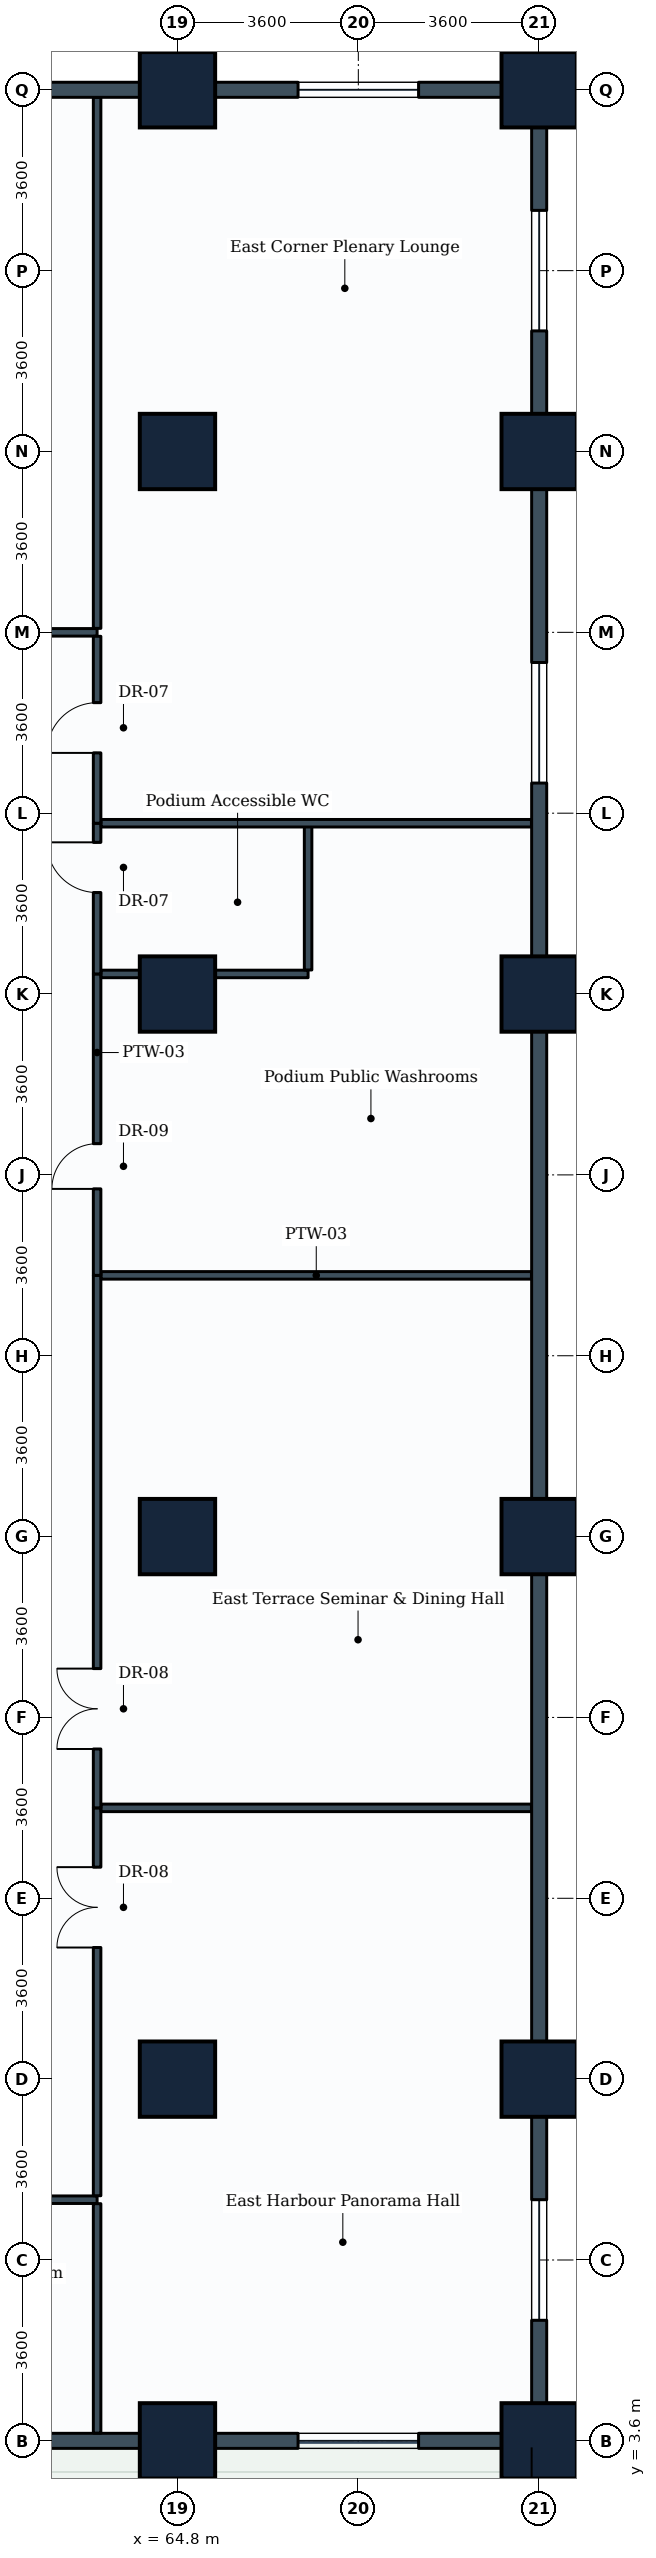
"""IFC4 building model, lengths in metres.
Left out: names, types, materials, properties, quantities, classifications, styles, units other than length and angle.
Written with IfcOpenShell. Run it as: python <this file> out.ifc"""

import sys

from ifc_helpers import new_model, si_unit, direction, frame, frame_2d, origin, origin_2d, place, context, subcontext, project, spatial, rectangle, extrude, element, fill, save


model = new_model("IFC4")
c1 = context("Model", 3, precision=1e-05, world=origin(), true_north=direction((0.0, 1.0)))
c2 = subcontext(c1, "Body", "Model", "MODEL_VIEW")
j1 = project(units=[si_unit("LENGTHUNIT", "METRE"), si_unit("PLANEANGLEUNIT", "RADIAN")], contexts=[c1])
p1 = place(None, origin())
s1 = spatial("IfcSite", under=j1, at=p1, CompositionType="ELEMENT")
p2 = place(p1, origin())
s2 = spatial("IfcBuilding", under=s1, at=p2, CompositionType="ELEMENT")
p3 = place(p2, frame((0.0, 0.0, 14.8)))
s3 = spatial("IfcBuildingStorey", under=s2, at=p3, CompositionType="ELEMENT", Elevation=14.8)
for number, where, z_axis, x_axis in (
    (1, (64.8, 3.6, 0.0), (0.0, 0.0, 1.0), (1.0, 0.0, 0.0)),
    (2, (64.8, 10.8, 0.0), (0.0, 0.0, 1.0), (1.0, 0.0, 0.0)),
    (3, (64.8, 21.6, 0.0), (0.0, 0.0, 1.0), (1.0, 0.0, 0.0)),
    (4, (64.8, 32.4, 0.0), (0.0, 0.0, 1.0), (1.0, 0.0, 0.0)),
    (5, (64.8, 43.2, 0.0), (0.0, 0.0, 1.0), (1.0, 0.0, 0.0)),
    (6, (64.8, 50.4, 0.0), (0.0, 0.0, 1.0), (1.0, 0.0, 0.0)),
    (7, (72.0, 3.6, 0.0), (0.0, 0.0, 1.0), (1.0, 0.0, 0.0)),
    (8, (72.0, 10.8, 0.0), (0.0, 0.0, 1.0), (1.0, 0.0, 0.0)),
    (9, (72.0, 21.6, 0.0), (0.0, 0.0, 1.0), (1.0, 0.0, 0.0)),
    (10, (72.0, 32.4, 0.0), (0.0, 0.0, 1.0), (1.0, 0.0, 0.0)),
    (11, (72.0, 43.2, 0.0), (0.0, 0.0, 1.0), (1.0, 0.0, 0.0)),
    (12, (72.0, 50.4, 0.0), (0.0, 0.0, 1.0), (1.0, 0.0, 0.0)),
):
    element("IfcColumn", number, at=place(p3, frame(where, z_axis=z_axis, x_axis=x_axis)), inside=s3, PredefinedType="COLUMN", context=c2, shape_type="SweptSolid", body=[
        extrude(rectangle(XDim=1.5, YDim=1.5, at=origin_2d()), origin(), (0.0, 0.0, 1.0), 4.6),
    ])
p4 = place(p3, frame((64.8, 3.6, 0.0), z_axis=(0.0, 0.0, 1.0), x_axis=(-1.0, 0.0, 0.0)))
e13 = element("IfcWall", 13, at=p4, inside=s3, PredefinedType="STANDARD", context=c2, shape_type="SweptSolid", body=[
    extrude(rectangle(XDim=10.8, YDim=0.3, at=frame_2d((5.4, 0.0))), origin(), (0.0, 0.0, 1.0), 3.63),
])
p5 = place(p4, frame((4.2, 0.0, 0.85)))
e14 = element("IfcOpeningElement", 14, at=p5, cuts=e13, PredefinedType="OPENING", context=c2, shape_type="SweptSolid", body=[
    extrude(rectangle(XDim=2.4, YDim=1.6, at=frame_2d((1.2, 0.8))), frame((0.0, 0.16, 0.0), z_axis=(0.0, -1.0, 0.0), x_axis=(1.0, 0.0, 0.0)), (0.0, 0.0, 1.0), 0.32),
])
p6 = place(p3, frame((72.0, 3.6, 0.0), z_axis=(0.0, 0.0, 1.0), x_axis=(-1.0, 0.0, 0.0)))
e15 = element("IfcWall", 15, at=p6, inside=s3, PredefinedType="STANDARD", context=c2, shape_type="SweptSolid", body=[
    extrude(rectangle(XDim=7.2, YDim=0.3, at=frame_2d((3.6, 0.0))), origin(), (0.0, 0.0, 1.0), 3.23),
])
p7 = place(p6, frame((2.4, 0.0, 0.85)))
e16 = element("IfcOpeningElement", 16, at=p7, cuts=e15, PredefinedType="OPENING", context=c2, shape_type="SweptSolid", body=[
    extrude(rectangle(XDim=2.4, YDim=1.6, at=frame_2d((1.2, 0.8))), frame((0.0, 0.16, 0.0), z_axis=(0.0, -1.0, 0.0), x_axis=(1.0, 0.0, 0.0)), (0.0, 0.0, 1.0), 0.32),
])
p8 = place(p3, frame((72.0, 10.8, 0.0), z_axis=(0.0, 0.0, 1.0), x_axis=(0.0, -1.0, 0.0)))
e17 = element("IfcWall", 17, at=p8, inside=s3, PredefinedType="STANDARD", context=c2, shape_type="SweptSolid", body=[
    extrude(rectangle(XDim=7.2, YDim=0.3, at=frame_2d((3.6, 0.0))), origin(), (0.0, 0.0, 1.0), 3.23),
])
p9 = place(p8, frame((2.4, 0.0, 0.85)))
e18 = element("IfcOpeningElement", 18, at=p9, cuts=e17, PredefinedType="OPENING", context=c2, shape_type="SweptSolid", body=[
    extrude(rectangle(XDim=2.4, YDim=1.6, at=frame_2d((1.2, 0.8))), frame((0.0, 0.16, 0.0), z_axis=(0.0, -1.0, 0.0), x_axis=(1.0, 0.0, 0.0)), (0.0, 0.0, 1.0), 0.32),
])
p10 = place(p3, frame((72.0, 21.6, 0.0), z_axis=(0.0, 0.0, 1.0), x_axis=(0.0, -1.0, 0.0)))
e19 = element("IfcWall", 19, at=p10, inside=s3, PredefinedType="STANDARD", context=c2, shape_type="SweptSolid", body=[
    extrude(rectangle(XDim=10.8, YDim=0.3, at=frame_2d((5.4, 0.0))), origin(), (0.0, 0.0, 1.0), 3.23),
])
p11 = place(p3, frame((72.0, 32.4, 0.0), z_axis=(0.0, 0.0, 1.0), x_axis=(0.0, -1.0, 0.0)))
e20 = element("IfcWall", 20, at=p11, inside=s3, PredefinedType="STANDARD", context=c2, shape_type="SweptSolid", body=[
    extrude(rectangle(XDim=10.8, YDim=0.3, at=frame_2d((5.4, 0.0))), origin(), (0.0, 0.0, 1.0), 3.23),
])
p12 = place(p3, frame((72.0, 43.2, 0.0), z_axis=(0.0, 0.0, 1.0), x_axis=(0.0, -1.0, 0.0)))
e21 = element("IfcWall", 21, at=p12, inside=s3, PredefinedType="STANDARD", context=c2, shape_type="SweptSolid", body=[
    extrude(rectangle(XDim=10.8, YDim=0.3, at=frame_2d((5.4, 0.0))), origin(), (0.0, 0.0, 1.0), 3.23),
])
p13 = place(p12, frame((4.2, 0.0, 0.85)))
e22 = element("IfcOpeningElement", 22, at=p13, cuts=e21, PredefinedType="OPENING", context=c2, shape_type="SweptSolid", body=[
    extrude(rectangle(XDim=2.4, YDim=1.6, at=frame_2d((1.2, 0.8))), frame((0.0, 0.16, 0.0), z_axis=(0.0, -1.0, 0.0), x_axis=(1.0, 0.0, 0.0)), (0.0, 0.0, 1.0), 0.32),
])
p14 = place(p3, frame((72.0, 50.4, 0.0), z_axis=(0.0, 0.0, 1.0), x_axis=(0.0, -1.0, 0.0)))
e23 = element("IfcWall", 23, at=p14, inside=s3, PredefinedType="STANDARD", context=c2, shape_type="SweptSolid", body=[
    extrude(rectangle(XDim=7.2, YDim=0.3, at=frame_2d((3.6, 0.0))), origin(), (0.0, 0.0, 1.0), 3.23),
])
p15 = place(p14, frame((2.4, 0.0, 0.85)))
e24 = element("IfcOpeningElement", 24, at=p15, cuts=e23, PredefinedType="OPENING", context=c2, shape_type="SweptSolid", body=[
    extrude(rectangle(XDim=2.4, YDim=1.6, at=frame_2d((1.2, 0.8))), frame((0.0, 0.16, 0.0), z_axis=(0.0, -1.0, 0.0), x_axis=(1.0, 0.0, 0.0)), (0.0, 0.0, 1.0), 0.32),
])
p16 = place(p3, frame((54.0, 50.4, 0.0), z_axis=(0.0, 0.0, 1.0), x_axis=(1.0, 0.0, 0.0)))
e25 = element("IfcWall", 25, at=p16, inside=s3, PredefinedType="STANDARD", context=c2, shape_type="SweptSolid", body=[
    extrude(rectangle(XDim=10.8, YDim=0.3, at=frame_2d((5.4, 0.0))), origin(), (0.0, 0.0, 1.0), 3.63),
])
p17 = place(p16, frame((4.2, 0.0, 0.85)))
e26 = element("IfcOpeningElement", 26, at=p17, cuts=e25, PredefinedType="OPENING", context=c2, shape_type="SweptSolid", body=[
    extrude(rectangle(XDim=2.4, YDim=1.6, at=frame_2d((1.2, 0.8))), frame((0.0, 0.16, 0.0), z_axis=(0.0, -1.0, 0.0), x_axis=(1.0, 0.0, 0.0)), (0.0, 0.0, 1.0), 0.32),
])
p18 = place(p3, frame((64.8, 50.4, 0.0), z_axis=(0.0, 0.0, 1.0), x_axis=(1.0, 0.0, 0.0)))
e27 = element("IfcWall", 27, at=p18, inside=s3, PredefinedType="STANDARD", context=c2, shape_type="SweptSolid", body=[
    extrude(rectangle(XDim=7.2, YDim=0.3, at=frame_2d((3.6, 0.0))), origin(), (0.0, 0.0, 1.0), 3.23),
])
p19 = place(p18, frame((2.4, 0.0, 0.85)))
e28 = element("IfcOpeningElement", 28, at=p19, cuts=e27, PredefinedType="OPENING", context=c2, shape_type="SweptSolid", body=[
    extrude(rectangle(XDim=2.4, YDim=1.6, at=frame_2d((1.2, 0.8))), frame((0.0, 0.16, 0.0), z_axis=(0.0, -1.0, 0.0), x_axis=(1.0, 0.0, 0.0)), (0.0, 0.0, 1.0), 0.32),
])
p20 = place(p3, frame((54.0, 8.4, 0.0), z_axis=(0.0, 0.0, 1.0), x_axis=(1.0, 0.0, 0.0)))
e29 = element("IfcWall", 29, at=p20, inside=s3, PredefinedType="PARTITIONING", context=c2, shape_type="SweptSolid", body=[
    extrude(rectangle(XDim=9.2, YDim=0.15, at=frame_2d((4.6, 0.0))), origin(), (0.0, 0.0, 1.0), 3.63),
])
p21 = place(p20, frame((3.482, 0.0, 0.0)))
e30 = element("IfcOpeningElement", 30, at=p21, cuts=e29, PredefinedType="OPENING", context=c2, shape_type="SweptSolid", body=[
    extrude(rectangle(XDim=1.6, YDim=2.2, at=frame_2d((0.8, 1.1))), frame((0.0, 0.085, 0.0), z_axis=(0.0, -1.0, 0.0), x_axis=(1.0, 0.0, 0.0)), (0.0, 0.0, 1.0), 0.17),
])
p22 = place(p3, frame((33.6, 39.6, 0.0), z_axis=(0.0, 0.0, 1.0), x_axis=(1.0, 0.0, 0.0)))
e31 = element("IfcWall", 31, at=p22, inside=s3, PredefinedType="PARTITIONING", context=c2, shape_type="SweptSolid", body=[
    extrude(rectangle(XDim=29.6, YDim=0.15, at=frame_2d((14.8, 0.0))), origin(), (0.0, 0.0, 1.0), 3.63),
])
p23 = place(p22, frame((13.96, 0.0, 0.0)))
e32 = element("IfcOpeningElement", 32, at=p23, cuts=e31, PredefinedType="OPENING", context=c2, shape_type="SweptSolid", body=[
    extrude(rectangle(XDim=1.6, YDim=2.2, at=frame_2d((0.8, 1.1))), frame((0.0, 0.085, 0.0), z_axis=(0.0, -1.0, 0.0), x_axis=(1.0, 0.0, 0.0)), (0.0, 0.0, 1.0), 0.17),
])
p24 = place(p3, frame((63.2, 3.754, 0.0), z_axis=(0.0, 0.0, 1.0), x_axis=(0.0, 1.0, 0.0)))
e33 = element("IfcWall", 33, at=p24, inside=s3, PredefinedType="PARTITIONING", context=c2, shape_type="SweptSolid", body=[
    extrude(rectangle(XDim=4.567, YDim=0.15, at=frame_2d((2.284, 0.0))), origin(), (0.0, 0.0, 1.0), 4.285),
])
p25 = place(p3, frame((63.2, 8.479, 0.0), z_axis=(0.0, 0.0, 1.0), x_axis=(0.0, 1.0, 0.0)))
e34 = element("IfcWall", 34, at=p25, inside=s3, PredefinedType="PARTITIONING", context=c2, shape_type="SweptSolid", body=[
    extrude(rectangle(XDim=7.721, YDim=0.15, at=frame_2d((3.86, 0.0))), origin(), (0.0, 0.0, 1.0), 3.63),
])
p26 = place(p25, frame((4.941, 0.0, 0.0)))
e35 = element("IfcOpeningElement", 35, at=p26, cuts=e34, PredefinedType="OPENING", context=c2, shape_type="SweptSolid", body=[
    extrude(rectangle(XDim=1.6, YDim=2.2, at=frame_2d((0.8, 1.1))), frame((0.0, 0.085, 0.0), z_axis=(0.0, -1.0, 0.0), x_axis=(1.0, 0.0, 0.0)), (0.0, 0.0, 1.0), 0.17),
])
p27 = place(p3, frame((63.279, 16.2, 0.0), z_axis=(0.0, 0.0, 1.0), x_axis=(1.0, 0.0, 0.0)))
e36 = element("IfcWall", 36, at=p27, inside=s3, PredefinedType="PARTITIONING", context=c2, shape_type="SweptSolid", body=[
    extrude(rectangle(XDim=8.567, YDim=0.15, at=frame_2d((4.283, 0.0))), origin(), (0.0, 0.0, 1.0), 3.63),
])
p28 = place(p3, frame((63.2, 16.2, 0.0), z_axis=(0.0, 0.0, 1.0), x_axis=(0.0, 1.0, 0.0)))
e37 = element("IfcWall", 37, at=p28, inside=s3, PredefinedType="PARTITIONING", context=c2, shape_type="SweptSolid", body=[
    extrude(rectangle(XDim=10.6, YDim=0.15, at=frame_2d((5.3, 0.0))), origin(), (0.0, 0.0, 1.0), 3.63),
])
p29 = place(p28, frame((1.172, 0.0, 0.0)))
e38 = element("IfcOpeningElement", 38, at=p29, cuts=e37, PredefinedType="OPENING", context=c2, shape_type="SweptSolid", body=[
    extrude(rectangle(XDim=1.6, YDim=2.2, at=frame_2d((0.8, 1.1))), frame((0.0, 0.085, 0.0), z_axis=(0.0, -1.0, 0.0), x_axis=(1.0, 0.0, 0.0)), (0.0, 0.0, 1.0), 0.17),
])
p30 = place(p3, frame((63.279, 26.8, 0.0), z_axis=(0.0, 0.0, 1.0), x_axis=(1.0, 0.0, 0.0)))
e39 = element("IfcWall", 39, at=p30, inside=s3, PredefinedType="PARTITIONING", context=c2, shape_type="SweptSolid", body=[
    extrude(rectangle(XDim=8.567, YDim=0.15, at=frame_2d((4.283, 0.0))), origin(), (0.0, 0.0, 1.0), 3.63),
])
p31 = place(p3, frame((63.2, 26.8, 0.0), z_axis=(0.0, 0.0, 1.0), x_axis=(0.0, 1.0, 0.0)))
e40 = element("IfcWall", 40, at=p31, inside=s3, PredefinedType="PARTITIONING", context=c2, shape_type="SweptSolid", body=[
    extrude(rectangle(XDim=6.0, YDim=0.15, at=frame_2d((3.0, 0.0))), origin(), (0.0, 0.0, 1.0), 3.63),
])
p32 = place(p31, frame((1.721, 0.0, 0.0)))
e41 = element("IfcOpeningElement", 41, at=p32, cuts=e40, PredefinedType="OPENING", context=c2, shape_type="SweptSolid", body=[
    extrude(rectangle(XDim=0.9, YDim=2.1, at=frame_2d((0.45, 1.05))), frame((0.0, 0.085, 0.0), z_axis=(0.0, -1.0, 0.0), x_axis=(1.0, 0.0, 0.0)), (0.0, 0.0, 1.0), 0.17),
])
p33 = place(p3, frame((63.279, 32.8, 0.0), z_axis=(0.0, 0.0, 1.0), x_axis=(1.0, 0.0, 0.0)))
e42 = element("IfcWall", 42, at=p33, inside=s3, PredefinedType="PARTITIONING", context=c2, shape_type="SweptSolid", body=[
    extrude(rectangle(XDim=4.121, YDim=0.15, at=frame_2d((2.061, 0.0))), origin(), (0.0, 0.0, 1.0), 3.23),
])
p34 = place(p3, frame((67.4, 32.879, 0.0), z_axis=(0.0, 0.0, 1.0), x_axis=(0.0, 1.0, 0.0)))
e43 = element("IfcWall", 43, at=p34, inside=s3, PredefinedType="PARTITIONING", context=c2, shape_type="SweptSolid", body=[
    extrude(rectangle(XDim=2.921, YDim=0.15, at=frame_2d((1.46, 0.0))), origin(), (0.0, 0.0, 1.0), 4.285),
])
p35 = place(p3, frame((63.2, 32.8, 0.0), z_axis=(0.0, 0.0, 1.0), x_axis=(0.0, 1.0, 0.0)))
e44 = element("IfcWall", 44, at=p35, inside=s3, PredefinedType="PARTITIONING", context=c2, shape_type="SweptSolid", body=[
    extrude(rectangle(XDim=3.0, YDim=0.15, at=frame_2d((1.5, 0.0))), origin(), (0.0, 0.0, 1.0), 4.285),
])
p36 = place(p35, frame((1.62, 0.0, 0.0)))
e45 = element("IfcOpeningElement", 45, at=p36, cuts=e44, PredefinedType="OPENING", context=c2, shape_type="SweptSolid", body=[
    extrude(rectangle(XDim=1.0, YDim=2.1, at=frame_2d((0.5, 1.05))), frame((0.0, 0.085, 0.0), z_axis=(0.0, -1.0, 0.0), x_axis=(1.0, 0.0, 0.0)), (0.0, 0.0, 1.0), 0.17),
])
p37 = place(p3, frame((63.279, 35.8, 0.0), z_axis=(0.0, 0.0, 1.0), x_axis=(1.0, 0.0, 0.0)))
e46 = element("IfcWall", 46, at=p37, inside=s3, PredefinedType="PARTITIONING", context=c2, shape_type="SweptSolid", body=[
    extrude(rectangle(XDim=8.567, YDim=0.15, at=frame_2d((4.283, 0.0))), origin(), (0.0, 0.0, 1.0), 3.63),
])
p38 = place(p3, frame((63.2, 35.8, 0.0), z_axis=(0.0, 0.0, 1.0), x_axis=(0.0, 1.0, 0.0)))
e47 = element("IfcWall", 47, at=p38, inside=s3, PredefinedType="PARTITIONING", context=c2, shape_type="SweptSolid", body=[
    extrude(rectangle(XDim=3.721, YDim=0.15, at=frame_2d((1.86, 0.0))), origin(), (0.0, 0.0, 1.0), 4.285),
])
p39 = place(p38, frame((1.4, 0.0, 0.0)))
e48 = element("IfcOpeningElement", 48, at=p39, cuts=e47, PredefinedType="OPENING", context=c2, shape_type="SweptSolid", body=[
    extrude(rectangle(XDim=1.0, YDim=2.1, at=frame_2d((0.5, 1.05))), frame((0.0, 0.085, 0.0), z_axis=(0.0, -1.0, 0.0), x_axis=(1.0, 0.0, 0.0)), (0.0, 0.0, 1.0), 0.17),
])
p40 = place(p3, frame((63.2, 39.679, 0.0), z_axis=(0.0, 0.0, 1.0), x_axis=(0.0, 1.0, 0.0)))
e49 = element("IfcWall", 49, at=p40, inside=s3, PredefinedType="PARTITIONING", context=c2, shape_type="SweptSolid", body=[
    extrude(rectangle(XDim=10.567, YDim=0.15, at=frame_2d((5.284, 0.0))), origin(), (0.0, 0.0, 1.0), 3.63),
])
p41 = place(p7, origin())
e50 = element("IfcWindow", 50, at=p41, inside=s3, PartitioningType="SINGLE_PANEL", PredefinedType="WINDOW", context=c2, shape_type="SweptSolid", body=[
    extrude(rectangle(XDim=2.4, YDim=1.6, at=frame_2d((1.2, 0.8))), frame((0.0, 0.03, 0.0), z_axis=(0.0, -1.0, 0.0), x_axis=(1.0, 0.0, 0.0)), (0.0, 0.0, 1.0), 0.06),
])
fill(e16, e50)
p42 = place(p9, origin())
e51 = element("IfcWindow", 51, at=p42, inside=s3, PartitioningType="SINGLE_PANEL", PredefinedType="WINDOW", context=c2, shape_type="SweptSolid", body=[
    extrude(rectangle(XDim=2.4, YDim=1.6, at=frame_2d((1.2, 0.8))), frame((0.0, 0.03, 0.0), z_axis=(0.0, -1.0, 0.0), x_axis=(1.0, 0.0, 0.0)), (0.0, 0.0, 1.0), 0.06),
])
fill(e18, e51)
p43 = place(p13, origin())
e52 = element("IfcWindow", 52, at=p43, inside=s3, PartitioningType="SINGLE_PANEL", PredefinedType="WINDOW", context=c2, shape_type="SweptSolid", body=[
    extrude(rectangle(XDim=2.4, YDim=1.6, at=frame_2d((1.2, 0.8))), frame((0.0, 0.03, 0.0), z_axis=(0.0, -1.0, 0.0), x_axis=(1.0, 0.0, 0.0)), (0.0, 0.0, 1.0), 0.06),
])
fill(e22, e52)
p44 = place(p15, origin())
e53 = element("IfcWindow", 53, at=p44, inside=s3, PartitioningType="SINGLE_PANEL", PredefinedType="WINDOW", context=c2, shape_type="SweptSolid", body=[
    extrude(rectangle(XDim=2.4, YDim=1.6, at=frame_2d((1.2, 0.8))), frame((0.0, 0.03, 0.0), z_axis=(0.0, -1.0, 0.0), x_axis=(1.0, 0.0, 0.0)), (0.0, 0.0, 1.0), 0.06),
])
fill(e24, e53)
p45 = place(p19, origin())
e54 = element("IfcWindow", 54, at=p45, inside=s3, PartitioningType="SINGLE_PANEL", PredefinedType="WINDOW", context=c2, shape_type="SweptSolid", body=[
    extrude(rectangle(XDim=2.4, YDim=1.6, at=frame_2d((1.2, 0.8))), frame((0.0, 0.03, 0.0), z_axis=(0.0, -1.0, 0.0), x_axis=(1.0, 0.0, 0.0)), (0.0, 0.0, 1.0), 0.06),
])
fill(e28, e54)
p46 = place(p26, origin())
e55 = element("IfcDoor", 55, at=p46, inside=s3, OperationType="DOUBLE_DOOR_SINGLE_SWING", PredefinedType="DOOR", context=c2, shape_type="SweptSolid", body=[
    extrude(rectangle(XDim=1.6, YDim=2.2, at=frame_2d((0.8, 1.1))), frame((0.0, 0.025, 0.0), z_axis=(0.0, -1.0, 0.0), x_axis=(1.0, 0.0, 0.0)), (0.0, 0.0, 1.0), 0.05),
])
fill(e35, e55)
p47 = place(p29, origin())
e56 = element("IfcDoor", 56, at=p47, inside=s3, OperationType="DOUBLE_DOOR_SINGLE_SWING", PredefinedType="DOOR", context=c2, shape_type="SweptSolid", body=[
    extrude(rectangle(XDim=1.6, YDim=2.2, at=frame_2d((0.8, 1.1))), frame((0.0, 0.025, 0.0), z_axis=(0.0, -1.0, 0.0), x_axis=(1.0, 0.0, 0.0)), (0.0, 0.0, 1.0), 0.05),
])
fill(e38, e56)
p48 = place(p32, origin())
e57 = element("IfcDoor", 57, at=p48, inside=s3, OperationType="SINGLE_SWING_LEFT", PredefinedType="DOOR", context=c2, shape_type="SweptSolid", body=[
    extrude(rectangle(XDim=0.9, YDim=2.1, at=frame_2d((0.45, 1.05))), frame((0.0, 0.025, 0.0), z_axis=(0.0, -1.0, 0.0), x_axis=(1.0, 0.0, 0.0)), (0.0, 0.0, 1.0), 0.05),
])
fill(e41, e57)
p49 = place(p36, origin())
e58 = element("IfcDoor", 58, at=p49, inside=s3, OperationType="SINGLE_SWING_RIGHT", PredefinedType="DOOR", context=c2, shape_type="SweptSolid", body=[
    extrude(rectangle(XDim=1.0, YDim=2.1, at=frame_2d((0.5, 1.05))), frame((0.0, 0.025, 0.0), z_axis=(0.0, -1.0, 0.0), x_axis=(1.0, 0.0, 0.0)), (0.0, 0.0, 1.0), 0.05),
])
fill(e45, e58)
p50 = place(p39, origin())
e59 = element("IfcDoor", 59, at=p50, inside=s3, OperationType="SINGLE_SWING_LEFT", PredefinedType="DOOR", context=c2, shape_type="SweptSolid", body=[
    extrude(rectangle(XDim=1.0, YDim=2.1, at=frame_2d((0.5, 1.05))), frame((0.0, 0.025, 0.0), z_axis=(0.0, -1.0, 0.0), x_axis=(1.0, 0.0, 0.0)), (0.0, 0.0, 1.0), 0.05),
])
fill(e48, e59)
save(model, sys.argv[1])
